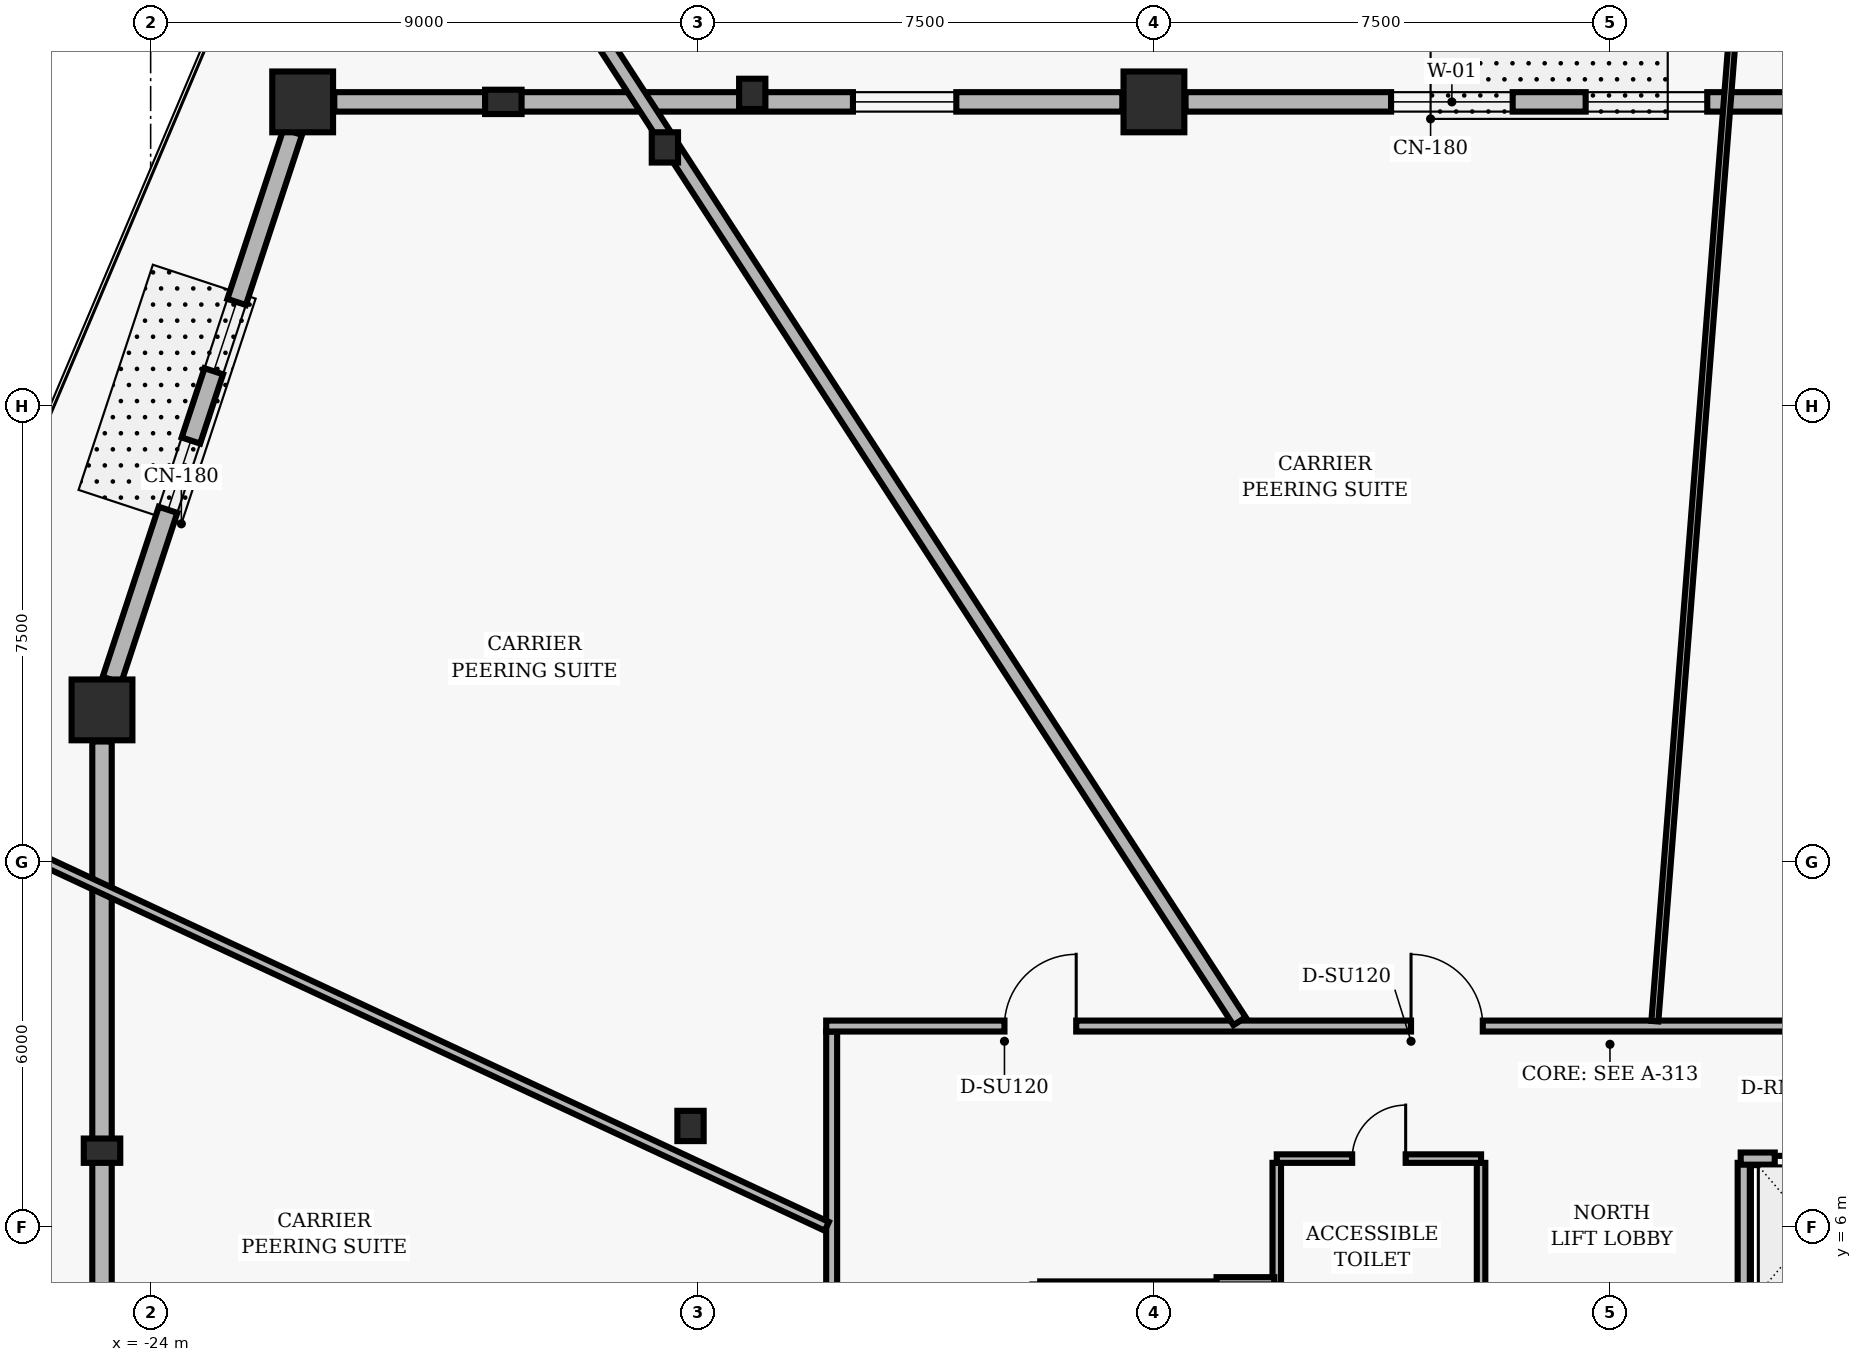
"""IFC4 building model, lengths in metres.
Left out: names, types, materials, properties, quantities, classifications, styles, units other than length and angle.
Written with IfcOpenShell. Run it as: python <this file> out.ifc"""

import sys

from ifc_helpers import new_model, si_unit, direction, frame, frame_2d, origin, origin_2d, place, context, subcontext, project, spatial, rectangle, i_section, extrude, element, fill, save


model = new_model("IFC4")
c1 = context("Model", 3, precision=1e-05, world=origin(), true_north=direction((0.0, 1.0)))
c2 = subcontext(c1, "Body", "Model", "MODEL_VIEW")
j1 = project(units=[si_unit("LENGTHUNIT", "METRE"), si_unit("PLANEANGLEUNIT", "RADIAN")], contexts=[c1])
p1 = place(None, origin())
s1 = spatial("IfcSite", under=j1, at=p1, CompositionType="ELEMENT")
p2 = place(p1, origin())
s2 = spatial("IfcBuilding", under=s1, at=p2, CompositionType="ELEMENT")
p3 = place(p2, frame((0.0, 0.0, 4.8)))
s3 = spatial("IfcBuildingStorey", under=s2, at=p3, CompositionType="ELEMENT", Elevation=4.8)
for number, where, z_axis, x_axis in (
    (1, (-7.5, 24.5, 0.0), (0.0, 0.0, 1.0), (1.0, 0.0, 0.0)),
    (2, (-21.5, 24.5, 0.0), (0.0, 0.0, 1.0), (1.0, 0.0, 0.0)),
    (3, (-24.8, 14.5, 0.0), (0.0, 0.0, 1.0), (1.0, 0.0, 0.0)),
):
    element("IfcColumn", number, at=place(p3, frame(where, z_axis=z_axis, x_axis=x_axis)), inside=s3, PredefinedType="COLUMN", context=c2, shape_type="SweptSolid", body=[
        extrude(rectangle(XDim=1.0, YDim=1.0, at=origin_2d()), origin(), (0.0, 0.0, 1.0), 3.52),
    ])
for number, where, z_axis, x_axis in (
    (4, (-14.106, 24.632, 0.0), (0.0, 0.0, 1.0), (1.0, 0.0, 0.0)),
    (5, (-15.543, 23.751, 0.0), (0.0, 0.0, 1.0), (1.0, 0.0, 0.0)),
    (6, (-15.121, 7.657, 0.0), (0.0, 0.0, 1.0), (1.0, 0.0, 0.0)),
):
    element("IfcColumn", number, at=place(p3, frame(where, z_axis=z_axis, x_axis=x_axis)), inside=s3, PredefinedType="COLUMN", context=c2, shape_type="SweptSolid", body=[
        extrude(i_section(OverallWidth=0.432, OverallDepth=0.498, WebThickness=0.056, FlangeThickness=0.089, FilletRadius=0.025, at=origin_2d()), origin(), (0.0, 0.0, 1.0), 3.52),
    ])
for number, where, z_axis, x_axis in (
    (7, (-18.2, 24.5, 0.0), (0.0, 0.0, 1.0), (1.0, 0.0, 0.0)),
    (8, (-24.8, 7.25, 0.0), (0.0, 0.0, 1.0), (1.0, 0.0, 0.0)),
):
    element("IfcColumn", number, at=place(p3, frame(where, z_axis=z_axis, x_axis=x_axis)), inside=s3, PredefinedType="PILASTER", context=c2, shape_type="SweptSolid", body=[
        extrude(rectangle(XDim=0.6, YDim=0.4, at=origin_2d()), origin(), (0.0, 0.0, 1.0), 3.52),
    ])
p4 = place(p3, frame((-6.98, 24.5, 0.0), z_axis=(0.0, 0.0, 1.0), x_axis=(1.0, 0.0, 0.0)))
e9 = element("IfcWall", 9, at=p4, inside=s3, PredefinedType="SOLIDWALL", context=c2, shape_type="SweptSolid", body=[
    extrude(rectangle(XDim=11.96, YDim=0.32, at=frame_2d((5.98, 0.0))), origin(), (0.0, 0.0, 1.0), 2.588),
])
p5 = place(p4, frame((3.38, 0.0, 0.65)))
e10 = element("IfcOpeningElement", 10, at=p5, cuts=e9, PredefinedType="OPENING", context=c2, shape_type="SweptSolid", body=[
    extrude(rectangle(XDim=2.0, YDim=1.6, at=frame_2d((1.0, 0.8))), frame((0.0, 0.17, 0.0), z_axis=(0.0, -1.0, 0.0), x_axis=(1.0, 0.0, 0.0)), (0.0, 0.0, 1.0), 0.34),
])
p6 = place(p4, frame((6.58, 0.0, 0.65)))
e11 = element("IfcOpeningElement", 11, at=p6, cuts=e9, PredefinedType="OPENING", context=c2, shape_type="SweptSolid", body=[
    extrude(rectangle(XDim=2.0, YDim=1.6, at=frame_2d((1.0, 0.8))), frame((0.0, 0.17, 0.0), z_axis=(0.0, -1.0, 0.0), x_axis=(1.0, 0.0, 0.0)), (0.0, 0.0, 1.0), 0.34),
])
p7 = place(p3, frame((-20.98, 24.5, 0.0), z_axis=(0.0, 0.0, 1.0), x_axis=(1.0, 0.0, 0.0)))
e12 = element("IfcWall", 12, at=p7, inside=s3, PredefinedType="SOLIDWALL", context=c2, shape_type="SweptSolid", body=[
    extrude(rectangle(XDim=12.96, YDim=0.32, at=frame_2d((6.48, 0.0))), origin(), (0.0, 0.0, 1.0), 2.588),
])
p8 = place(p7, frame((8.53, 0.0, 0.65)))
e13 = element("IfcOpeningElement", 13, at=p8, cuts=e12, PredefinedType="OPENING", context=c2, shape_type="SweptSolid", body=[
    extrude(rectangle(XDim=1.7, YDim=1.5, at=frame_2d((0.85, 0.75))), frame((0.0, 0.17, 0.0), z_axis=(0.0, -1.0, 0.0), x_axis=(1.0, 0.0, 0.0)), (0.0, 0.0, 1.0), 0.34),
])
p9 = place(p3, frame((-24.637, 14.994, 0.0), z_axis=(0.0, 0.0, 1.0), x_axis=(0.313363070681, 0.949633395544, 0.0)))
e14 = element("IfcWall", 14, at=p9, inside=s3, PredefinedType="SOLIDWALL", context=c2, shape_type="SweptSolid", body=[
    extrude(rectangle(XDim=9.49, YDim=0.32, at=frame_2d((4.745, 0.0))), origin(), (0.0, 0.0, 1.0), 2.588),
])
p10 = place(p9, frame((2.945, 0.0, 0.65)))
e15 = element("IfcOpeningElement", 15, at=p10, cuts=e14, PredefinedType="OPENING", context=c2, shape_type="SweptSolid", body=[
    extrude(rectangle(XDim=1.2, YDim=1.6, at=frame_2d((0.6, 0.8))), frame((0.0, 0.17, 0.0), z_axis=(0.0, -1.0, 0.0), x_axis=(1.0, 0.0, 0.0)), (0.0, 0.0, 1.0), 0.34),
])
p11 = place(p9, frame((5.345, 0.0, 0.65)))
e16 = element("IfcOpeningElement", 16, at=p11, cuts=e14, PredefinedType="OPENING", context=c2, shape_type="SweptSolid", body=[
    extrude(rectangle(XDim=1.2, YDim=1.6, at=frame_2d((0.6, 0.8))), frame((0.0, 0.17, 0.0), z_axis=(0.0, -1.0, 0.0), x_axis=(1.0, 0.0, 0.0)), (0.0, 0.0, 1.0), 0.34),
])
p12 = place(p3, frame((-24.8, 0.52, 0.0), z_axis=(0.0, 0.0, 1.0), x_axis=(0.0, 1.0, 0.0)))
e17 = element("IfcWall", 17, at=p12, inside=s3, PredefinedType="SOLIDWALL", context=c2, shape_type="SweptSolid", body=[
    extrude(rectangle(XDim=13.46, YDim=0.32, at=frame_2d((6.73, 0.0))), origin(), (0.0, 0.0, 1.0), 2.261),
])
p13 = place(p3, frame((2.2, 4.95, 0.0), z_axis=(0.0, 0.0, 1.0), x_axis=(0.0, 1.0, 0.0)))
e18 = element("IfcWall", 18, at=p13, inside=s3, PredefinedType="PARTITIONING", context=c2, shape_type="SweptSolid", body=[
    extrude(rectangle(XDim=2.1, YDim=0.2, at=frame_2d((1.05, 0.0))), origin(), (0.0, 0.0, 1.0), 3.193),
])
p14 = place(p3, frame((2.15, 7.12, 0.0), z_axis=(0.0, 0.0, 1.0), x_axis=(1.0, 0.0, 0.0)))
e19 = element("IfcWall", 19, at=p14, inside=s3, PredefinedType="PARTITIONING", context=c2, shape_type="SweptSolid", body=[
    extrude(rectangle(XDim=2.38, YDim=0.2, at=frame_2d((1.19, 0.0))), origin(), (0.0, 0.0, 1.0), 3.193),
])
p15 = place(p14, frame((0.56, 0.0, 0.0)))
e20 = element("IfcOpeningElement", 20, at=p15, cuts=e19, PredefinedType="OPENING", context=c2, shape_type="SweptSolid", body=[
    extrude(rectangle(XDim=1.26, YDim=2.06, at=frame_2d((0.63, 1.03))), frame((0.0, 0.11, 0.0), z_axis=(0.0, -1.0, 0.0), x_axis=(1.0, 0.0, 0.0)), (0.0, 0.0, 1.0), 0.22),
])
for number, where, z_axis, x_axis in (
    (21, (-5.48, 4.95, 0.0), (0.0, 0.0, 1.0), (0.0, 1.0, 0.0)),
    (22, (-2.12, 4.95, 0.0), (0.0, 0.0, 1.0), (0.0, 1.0, 0.0)),
):
    element("IfcWall", number, at=place(p3, frame(where, z_axis=z_axis, x_axis=x_axis)), inside=s3, PredefinedType="PARTITIONING", context=c2, shape_type="SweptSolid", body=[
        extrude(rectangle(XDim=2.1, YDim=0.14, at=frame_2d((1.05, 0.0))), origin(), (0.0, 0.0, 1.0), 3.193),
    ])
p16 = place(p3, frame((-5.48, 7.12, 0.0), z_axis=(0.0, 0.0, 1.0), x_axis=(1.0, 0.0, 0.0)))
e23 = element("IfcWall", 23, at=p16, inside=s3, PredefinedType="PARTITIONING", context=c2, shape_type="SweptSolid", body=[
    extrude(rectangle(XDim=3.36, YDim=0.14, at=frame_2d((1.68, 0.0))), origin(), (0.0, 0.0, 1.0), 3.193),
])
p17 = place(p16, frame((1.24, 0.0, 0.0)))
e24 = element("IfcOpeningElement", 24, at=p17, cuts=e23, PredefinedType="OPENING", context=c2, shape_type="SweptSolid", body=[
    extrude(rectangle(XDim=0.88, YDim=2.02, at=frame_2d((0.44, 1.01))), frame((0.0, 0.08, 0.0), z_axis=(0.0, -1.0, 0.0), x_axis=(1.0, 0.0, 0.0)), (0.0, 0.0, 1.0), 0.16),
])
p18 = place(p3, frame((-12.8, -3.61, 0.0), z_axis=(0.0, 0.0, 1.0), x_axis=(0.0, 1.0, 0.0)))
e25 = element("IfcWall", 25, at=p18, inside=s3, PredefinedType="PARTITIONING", context=c2, shape_type="SweptSolid", body=[
    extrude(rectangle(XDim=12.82, YDim=0.18, at=frame_2d((6.41, 0.0))), origin(), (0.0, 0.0, 1.0), 3.193),
])
p19 = place(p18, frame((6.7, 0.0, 0.0)))
e26 = element("IfcOpeningElement", 26, at=p19, cuts=e25, PredefinedType="OPENING", context=c2, shape_type="SweptSolid", body=[
    extrude(rectangle(XDim=1.18, YDim=2.02, at=frame_2d((0.59, 1.01))), frame((0.0, 0.1, 0.0), z_axis=(0.0, -1.0, 0.0), x_axis=(1.0, 0.0, 0.0)), (0.0, 0.0, 1.0), 0.2),
])
p20 = place(p3, frame((-12.89, 9.3, 0.0), z_axis=(0.0, 0.0, 1.0), x_axis=(1.0, 0.0, 0.0)))
e27 = element("IfcWall", 27, at=p20, inside=s3, PredefinedType="PARTITIONING", context=c2, shape_type="SweptSolid", body=[
    extrude(rectangle(XDim=25.78, YDim=0.18, at=frame_2d((12.89, 0.0))), origin(), (0.0, 0.0, 1.0), 2.76),
])
p21 = place(p20, frame((16.588, 0.0, 0.0)))
e28 = element("IfcOpeningElement", 28, at=p21, cuts=e27, PredefinedType="OPENING", context=c2, shape_type="SweptSolid", body=[
    extrude(rectangle(XDim=0.96, YDim=2.02, at=frame_2d((0.48, 1.01))), frame((0.0, 0.1, 0.0), z_axis=(0.0, -1.0, 0.0), x_axis=(1.0, 0.0, 0.0)), (0.0, 0.0, 1.0), 0.2),
])
p22 = place(p20, frame((9.618, 0.0, 0.0)))
e29 = element("IfcOpeningElement", 29, at=p22, cuts=e27, PredefinedType="OPENING", context=c2, shape_type="SweptSolid", body=[
    extrude(rectangle(XDim=1.18, YDim=2.02, at=frame_2d((0.59, 1.01))), frame((0.0, 0.1, 0.0), z_axis=(0.0, -1.0, 0.0), x_axis=(1.0, 0.0, 0.0)), (0.0, 0.0, 1.0), 0.2),
])
p23 = place(p20, frame((2.932, 0.0, 0.0)))
e30 = element("IfcOpeningElement", 30, at=p23, cuts=e27, PredefinedType="OPENING", context=c2, shape_type="SweptSolid", body=[
    extrude(rectangle(XDim=1.18, YDim=2.02, at=frame_2d((0.59, 1.01))), frame((0.0, 0.1, 0.0), z_axis=(0.0, -1.0, 0.0), x_axis=(1.0, 0.0, 0.0)), (0.0, 0.0, 1.0), 0.2),
])
p24 = place(p3, frame((-5.52, 5.08, 0.0), z_axis=(0.0, 0.0, 1.0), x_axis=(-1.0, 0.0, 0.0)))
e31 = element("IfcWall", 31, at=p24, inside=s3, PredefinedType="PARTITIONING", context=c2, shape_type="SweptSolid", body=[
    extrude(rectangle(XDim=0.95, YDim=0.18, at=frame_2d((0.475, 0.0))), origin(), (0.0, 0.0, 1.0), 3.193),
])
p25 = place(p3, frame((-6.562, 5.01, 0.0), z_axis=(0.0, 0.0, 1.0), x_axis=(-1.0, 0.0, 0.0)))
e32 = element("IfcWall", 32, at=p25, inside=s3, PredefinedType="PARTITIONING", context=c2, shape_type="SweptSolid", body=[
    extrude(rectangle(XDim=2.808, YDim=0.18, at=frame_2d((1.404, 0.0))), origin(), (0.0, 0.0, 1.0), 3.193),
])
p26 = place(p3, frame((0.738, 9.38, 0.0), z_axis=(0.0, 0.0, 1.0), x_axis=(0.078449467475, 0.996918091446, 0.0)))
e33 = element("IfcWall", 33, at=p26, inside=s3, PredefinedType="MOVABLE", context=c2, shape_type="SweptSolid", body=[
    extrude(rectangle(XDim=17.614, YDim=0.115, at=frame_2d((8.807, 0.0))), origin(), (0.0, 0.0, 1.0), 3.193),
])
p27 = place(p3, frame((-6.091, 9.38, 0.0), z_axis=(0.0, 0.0, 1.0), x_axis=(-0.544644853477, 0.838666789364, 0.0)))
e34 = element("IfcWall", 34, at=p27, inside=s3, PredefinedType="PARTITIONING", context=c2, shape_type="SweptSolid", body=[
    extrude(rectangle(XDim=20.938, YDim=0.24, at=frame_2d((10.469, 0.0))), origin(), (0.0, 0.0, 1.0), 3.193),
])
p28 = place(p3, frame((-12.88, 6.006, 0.0), z_axis=(0.0, 0.0, 1.0), x_axis=(-0.906309362581, 0.422614882959, 0.0)))
e35 = element("IfcWall", 35, at=p28, inside=s3, PredefinedType="PARTITIONING", context=c2, shape_type="SweptSolid", body=[
    extrude(rectangle(XDim=15.017, YDim=0.16, at=frame_2d((7.509, 0.0))), origin(), (0.0, 0.0, 1.0), 3.193),
])
p29 = place(p5, origin())
e36 = element("IfcWindow", 36, at=p29, inside=s3, PartitioningType="SINGLE_PANEL", PredefinedType="WINDOW", context=c2, shape_type="SweptSolid", body=[
    extrude(rectangle(XDim=2.0, YDim=1.6, at=frame_2d((1.0, 0.8))), frame((0.0, 0.03, 0.0), z_axis=(0.0, -1.0, 0.0), x_axis=(1.0, 0.0, 0.0)), (0.0, 0.0, 1.0), 0.06),
])
fill(e10, e36)
p30 = place(p6, origin())
e37 = element("IfcWindow", 37, at=p30, inside=s3, PartitioningType="SINGLE_PANEL", PredefinedType="WINDOW", context=c2, shape_type="SweptSolid", body=[
    extrude(rectangle(XDim=2.0, YDim=1.6, at=frame_2d((1.0, 0.8))), frame((0.0, 0.03, 0.0), z_axis=(0.0, -1.0, 0.0), x_axis=(1.0, 0.0, 0.0)), (0.0, 0.0, 1.0), 0.06),
])
fill(e11, e37)
p31 = place(p8, origin())
e38 = element("IfcWindow", 38, at=p31, inside=s3, PartitioningType="SINGLE_PANEL", PredefinedType="WINDOW", context=c2, shape_type="SweptSolid", body=[
    extrude(rectangle(XDim=1.7, YDim=1.5, at=frame_2d((0.85, 0.75))), frame((0.0, 0.03, 0.0), z_axis=(0.0, -1.0, 0.0), x_axis=(1.0, 0.0, 0.0)), (0.0, 0.0, 1.0), 0.06),
])
fill(e13, e38)
p32 = place(p10, origin())
e39 = element("IfcWindow", 39, at=p32, inside=s3, PartitioningType="SINGLE_PANEL", PredefinedType="WINDOW", context=c2, shape_type="SweptSolid", body=[
    extrude(rectangle(XDim=1.2, YDim=1.6, at=frame_2d((0.6, 0.8))), frame((0.0, 0.03, 0.0), z_axis=(0.0, -1.0, 0.0), x_axis=(1.0, 0.0, 0.0)), (0.0, 0.0, 1.0), 0.06),
])
fill(e15, e39)
p33 = place(p11, origin())
e40 = element("IfcWindow", 40, at=p33, inside=s3, PartitioningType="SINGLE_PANEL", PredefinedType="WINDOW", context=c2, shape_type="SweptSolid", body=[
    extrude(rectangle(XDim=1.2, YDim=1.6, at=frame_2d((0.6, 0.8))), frame((0.0, 0.03, 0.0), z_axis=(0.0, -1.0, 0.0), x_axis=(1.0, 0.0, 0.0)), (0.0, 0.0, 1.0), 0.06),
])
fill(e16, e40)
p34 = place(p15, origin())
e41 = element("IfcDoor", 41, at=p34, inside=s3, OperationType="SLIDING_TO_LEFT", PredefinedType="DOOR", context=c2, shape_type="SweptSolid", body=[
    extrude(rectangle(XDim=1.26, YDim=2.06, at=frame_2d((0.63, 1.03))), frame((0.0, 0.025, 0.0), z_axis=(0.0, -1.0, 0.0), x_axis=(1.0, 0.0, 0.0)), (0.0, 0.0, 1.0), 0.05),
])
fill(e20, e41)
p35 = place(p17, origin())
e42 = element("IfcDoor", 42, at=p35, inside=s3, OperationType="SINGLE_SWING_RIGHT", PredefinedType="DOOR", context=c2, shape_type="SweptSolid", body=[
    extrude(rectangle(XDim=0.88, YDim=2.02, at=frame_2d((0.44, 1.01))), frame((0.0, 0.025, 0.0), z_axis=(0.0, -1.0, 0.0), x_axis=(1.0, 0.0, 0.0)), (0.0, 0.0, 1.0), 0.05),
])
fill(e24, e42)
p36 = place(p22, origin())
e43 = element("IfcDoor", 43, at=p36, inside=s3, OperationType="SINGLE_SWING_LEFT", PredefinedType="DOOR", context=c2, shape_type="SweptSolid", body=[
    extrude(rectangle(XDim=1.18, YDim=2.02, at=frame_2d((0.59, 1.01))), frame((0.0, 0.025, 0.0), z_axis=(0.0, -1.0, 0.0), x_axis=(1.0, 0.0, 0.0)), (0.0, 0.0, 1.0), 0.05),
])
fill(e29, e43)
p37 = place(p23, origin())
e44 = element("IfcDoor", 44, at=p37, inside=s3, OperationType="SINGLE_SWING_RIGHT", PredefinedType="DOOR", context=c2, shape_type="SweptSolid", body=[
    extrude(rectangle(XDim=1.18, YDim=2.02, at=frame_2d((0.59, 1.01))), frame((0.0, 0.025, 0.0), z_axis=(0.0, -1.0, 0.0), x_axis=(1.0, 0.0, 0.0)), (0.0, 0.0, 1.0), 0.05),
])
fill(e30, e44)
save(model, sys.argv[1])
